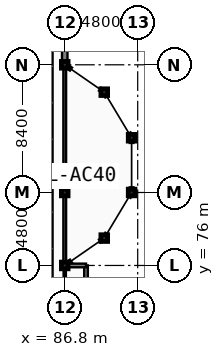
"""IFC4 building model, lengths in metres.
Left out: names, types, materials, properties, quantities, classifications, styles, units other than length and angle.
Written with IfcOpenShell. Run it as: python <this file> out.ifc"""

import sys

from ifc_helpers import new_model, si_unit, direction, frame, frame_2d, origin, origin_2d, place, context, subcontext, project, spatial, rectangle, extrude, element, fill, save


model = new_model("IFC4")
c1 = context("Model", 3, precision=1e-05, world=origin(), true_north=direction((0.0, 1.0)))
c2 = subcontext(c1, "Body", "Model", "MODEL_VIEW")
j1 = project(units=[si_unit("LENGTHUNIT", "METRE"), si_unit("PLANEANGLEUNIT", "RADIAN")], contexts=[c1])
p1 = place(None, origin())
s1 = spatial("IfcSite", under=j1, at=p1, CompositionType="ELEMENT")
p2 = place(p1, origin())
s2 = spatial("IfcBuilding", under=s1, at=p2, CompositionType="ELEMENT")
p3 = place(p2, frame((0.0, 0.0, 9.6)))
s3 = spatial("IfcBuildingStorey", under=s2, at=p3, CompositionType="ELEMENT", Elevation=9.6)
for number, where, z_axis, x_axis in (
    (1, (86.8, 76.0, 0.0), (0.0, 0.0, 1.0), (1.0, 0.0, 0.0)),
    (2, (86.8, 80.8, 0.0), (0.0, 0.0, 1.0), (1.0, 0.0, 0.0)),
    (3, (86.8, 89.2, 0.0), (0.0, 0.0, 1.0), (1.0, 0.0, 0.0)),
    (4, (89.4, 77.8, 0.0), (0.0, 0.0, 1.0), (1.0, 0.0, 0.0)),
    (5, (89.4, 87.4, 0.0), (0.0, 0.0, 1.0), (1.0, 0.0, 0.0)),
    (6, (91.2, 80.8, 0.0), (0.0, 0.0, 1.0), (1.0, 0.0, 0.0)),
    (7, (91.2, 84.4, 0.0), (0.0, 0.0, 1.0), (1.0, 0.0, 0.0)),
):
    element("IfcColumn", number, at=place(p3, frame(where, z_axis=z_axis, x_axis=x_axis)), inside=s3, PredefinedType="COLUMN", context=c2, shape_type="SweptSolid", body=[
        extrude(rectangle(XDim=0.44, YDim=0.44, at=origin_2d()), origin(), (0.0, 0.0, 1.0), 4.2),
    ])
p4 = place(p3, frame((86.8, 67.6, 0.0), z_axis=(0.0, 0.0, 1.0), x_axis=(0.0, 1.0, 0.0)))
e8 = element("IfcWall", 8, at=p4, inside=s3, PredefinedType="PARTITIONING", context=c2, shape_type="SweptSolid", body=[
    extrude(rectangle(XDim=8.4, YDim=0.15, at=frame_2d((4.2, 0.0))), origin(), (0.0, 0.0, 1.0), 3.27),
])
p5 = place(p4, frame((3.7, 0.0, -0.01)))
e9 = element("IfcOpeningElement", 9, at=p5, cuts=e8, PredefinedType="OPENING", context=c2, shape_type="SweptSolid", body=[
    extrude(rectangle(XDim=1.0, YDim=2.16, at=frame_2d((0.5, 1.08))), frame((0.0, 0.085, 0.0), z_axis=(0.0, -1.0, 0.0), x_axis=(1.0, 0.0, 0.0)), (0.0, 0.0, 1.0), 0.17),
])
p6 = place(p3, frame((86.8, 76.0, 0.0), z_axis=(0.0, 0.0, 1.0), x_axis=(0.0, 1.0, 0.0)))
e10 = element("IfcWall", 10, at=p6, inside=s3, PredefinedType="PARTITIONING", context=c2, shape_type="SweptSolid", body=[
    extrude(rectangle(XDim=13.2, YDim=0.18, at=frame_2d((6.6, 0.0))), origin(), (0.0, 0.0, 1.0), 3.27),
])
p7 = place(p6, frame((5.8, 0.0, -0.01)))
e11 = element("IfcOpeningElement", 11, at=p7, cuts=e10, PredefinedType="OPENING", context=c2, shape_type="SweptSolid", body=[
    extrude(rectangle(XDim=1.6, YDim=2.21, at=frame_2d((0.8, 1.105))), frame((0.0, 0.1, 0.0), z_axis=(0.0, -1.0, 0.0), x_axis=(1.0, 0.0, 0.0)), (0.0, 0.0, 1.0), 0.2),
])
p8 = place(p3, frame((86.8, 89.2, 0.0), z_axis=(0.0, 0.0, 1.0), x_axis=(0.0, 1.0, 0.0)))
e12 = element("IfcWall", 12, at=p8, inside=s3, PredefinedType="SOLIDWALL", context=c2, shape_type="SweptSolid", body=[
    extrude(rectangle(XDim=8.4, YDim=0.36, at=frame_2d((4.2, 0.0))), origin(), (0.0, 0.0, 1.0), 3.27),
])
p9 = place(p8, frame((0.46, 0.0, 0.75)))
e13 = element("IfcOpeningElement", 13, at=p9, cuts=e12, PredefinedType="OPENING", context=c2, shape_type="SweptSolid", body=[
    extrude(rectangle(XDim=1.55, YDim=2.38, at=frame_2d((0.775, 1.19))), frame((0.0, 0.19, 0.0), z_axis=(0.0, -1.0, 0.0), x_axis=(1.0, 0.0, 0.0)), (0.0, 0.0, 1.0), 0.38),
])
p10 = place(p8, frame((6.26, 0.0, 0.75)))
e14 = element("IfcOpeningElement", 14, at=p10, cuts=e12, PredefinedType="OPENING", context=c2, shape_type="SweptSolid", body=[
    extrude(rectangle(XDim=1.55, YDim=2.38, at=frame_2d((0.775, 1.19))), frame((0.0, 0.19, 0.0), z_axis=(0.0, -1.0, 0.0), x_axis=(1.0, 0.0, 0.0)), (0.0, 0.0, 1.0), 0.38),
])
p11 = place(p3, frame((87.03, 76.159, 0.0), z_axis=(0.0, 0.0, 1.0), x_axis=(0.822192191644, 0.56920997883, 0.0)))
e15 = element("IfcWall", 15, at=p11, inside=s3, PredefinedType="SOLIDWALL", context=c2, shape_type="SweptSolid", body=[
    extrude(rectangle(XDim=0.22, YDim=0.24, at=frame_2d((0.11, 0.0))), origin(), (0.0, 0.0, 1.0), 3.27),
])
p12 = place(p3, frame((89.121, 77.606, 0.0), z_axis=(0.0, 0.0, 1.0), x_axis=(0.821855834467, 0.569695521619, 0.0)))
e16 = element("IfcWall", 16, at=p12, inside=s3, PredefinedType="SOLIDWALL", context=c2, shape_type="SweptSolid", body=[
    extrude(rectangle(XDim=0.34, YDim=0.24, at=frame_2d((0.17, 0.0))), origin(), (0.0, 0.0, 1.0), 3.27),
])
p13 = place(p3, frame((89.4, 77.8, 0.0), z_axis=(0.0, 0.0, 1.0), x_axis=(0.514812489021, 0.857302805984, 0.0)))
e17 = element("IfcWall", 17, at=p13, inside=s3, PredefinedType="SOLIDWALL", context=c2, shape_type="SweptSolid", body=[
    extrude(rectangle(XDim=0.34, YDim=0.24, at=frame_2d((0.17, 0.0))), origin(), (0.0, 0.0, 1.0), 3.27),
])
for number, where, z_axis, x_axis in (
    (18, (91.025, 80.509, 0.0), (0.0, 0.0, 1.0), (0.514, 0.858, 0.0)),
    (19, (91.2, 80.8, 0.0), (0.0, 0.0, 1.0), (0.0, 1.0, 0.0)),
    (20, (91.2, 84.06, 0.0), (0.0, 0.0, 1.0), (0.0, 1.0, 0.0)),
    (21, (91.2, 84.4, 0.0), (0.0, 0.0, 1.0), (-0.514, 0.858, 0.0)),
):
    element("IfcWall", number, at=place(p3, frame(where, z_axis=z_axis, x_axis=x_axis)), inside=s3, PredefinedType="SOLIDWALL", context=c2, shape_type="SweptSolid", body=[
        extrude(rectangle(XDim=0.34, YDim=0.24, at=frame_2d((0.17, 0.0))), origin(), (0.0, 0.0, 1.0), 3.27),
    ])
p14 = place(p3, frame((89.575, 87.108, 0.0), z_axis=(0.0, 0.0, 1.0), x_axis=(-0.514812489021, 0.857302805984, 0.0)))
e22 = element("IfcWall", 22, at=p14, inside=s3, PredefinedType="SOLIDWALL", context=c2, shape_type="SweptSolid", body=[
    extrude(rectangle(XDim=0.34, YDim=0.24, at=frame_2d((0.17, 0.0))), origin(), (0.0, 0.0, 1.0), 3.27),
])
p15 = place(p3, frame((89.4, 87.4, 0.0), z_axis=(0.0, 0.0, 1.0), x_axis=(-0.821855834467, 0.569695521619, 0.0)))
e23 = element("IfcWall", 23, at=p15, inside=s3, PredefinedType="SOLIDWALL", context=c2, shape_type="SweptSolid", body=[
    extrude(rectangle(XDim=0.34, YDim=0.24, at=frame_2d((0.17, 0.0))), origin(), (0.0, 0.0, 1.0), 3.27),
])
p16 = place(p3, frame((87.211, 88.915, 0.0), z_axis=(0.0, 0.0, 1.0), x_axis=(-0.822192191644, 0.56920997883, 0.0)))
e24 = element("IfcWall", 24, at=p16, inside=s3, PredefinedType="SOLIDWALL", context=c2, shape_type="SweptSolid", body=[
    extrude(rectangle(XDim=0.22, YDim=0.24, at=frame_2d((0.11, 0.0))), origin(), (0.0, 0.0, 1.0), 3.27),
])
p17 = place(p3, frame((88.2, 67.6, 0.0), z_axis=(0.0, 0.0, 1.0), x_axis=(0.0, 1.0, 0.0)))
e25 = element("IfcWall", 25, at=p17, inside=s3, PredefinedType="SOLIDWALL", context=c2, shape_type="SweptSolid", body=[
    extrude(rectangle(XDim=8.4, YDim=0.24, at=frame_2d((4.2, 0.0))), origin(), (0.0, 0.0, 1.0), 3.27),
])
p18 = place(p17, frame((0.46, 0.0, 0.65)))
e26 = element("IfcOpeningElement", 26, at=p18, cuts=e25, PredefinedType="OPENING", context=c2, shape_type="SweptSolid", body=[
    extrude(rectangle(XDim=2.4, YDim=2.2, at=frame_2d((1.2, 1.1))), frame((0.0, 0.13, 0.0), z_axis=(0.0, -1.0, 0.0), x_axis=(1.0, 0.0, 0.0)), (0.0, 0.0, 1.0), 0.26),
])
p19 = place(p17, frame((5.46, 0.0, 0.65)))
e27 = element("IfcOpeningElement", 27, at=p19, cuts=e25, PredefinedType="OPENING", context=c2, shape_type="SweptSolid", body=[
    extrude(rectangle(XDim=2.4, YDim=2.2, at=frame_2d((1.2, 1.1))), frame((0.0, 0.13, 0.0), z_axis=(0.0, -1.0, 0.0), x_axis=(1.0, 0.0, 0.0)), (0.0, 0.0, 1.0), 0.26),
])
p20 = place(p3, frame((88.2, 76.0, 0.0), z_axis=(0.0, 0.0, 1.0), x_axis=(-1.0, 0.0, 0.0)))
e28 = element("IfcWall", 28, at=p20, inside=s3, PredefinedType="SOLIDWALL", context=c2, shape_type="SweptSolid", body=[
    extrude(rectangle(XDim=1.4, YDim=0.24, at=frame_2d((0.7, 0.0))), origin(), (0.0, 0.0, 1.0), 3.27),
])
p21 = place(p7, frame((1.6, 0.0, 0.01), z_axis=(0.0, 0.0, 1.0), x_axis=(-1.0, 0.0, 0.0)))
e29 = element("IfcDoor", 29, at=p21, inside=s3, OperationType="DOUBLE_SWING_LEFT", PredefinedType="DOOR", context=c2, shape_type="SweptSolid", body=[
    extrude(rectangle(XDim=1.6, YDim=2.2, at=frame_2d((0.8, 1.1))), frame((0.0, 0.025, 0.0), z_axis=(0.0, -1.0, 0.0), x_axis=(1.0, 0.0, 0.0)), (0.0, 0.0, 1.0), 0.05),
])
fill(e11, e29)
p22 = place(p9, origin())
e30 = element("IfcWindow", 30, at=p22, inside=s3, PartitioningType="DOUBLE_PANEL_HORIZONTAL", PredefinedType="WINDOW", context=c2, shape_type="SweptSolid", body=[
    extrude(rectangle(XDim=1.55, YDim=2.38, at=frame_2d((0.775, 1.19))), frame((0.0, 0.03, 0.0), z_axis=(0.0, -1.0, 0.0), x_axis=(1.0, 0.0, 0.0)), (0.0, 0.0, 1.0), 0.06),
])
fill(e13, e30)
p23 = place(p19, origin())
e31 = element("IfcWindow", 31, at=p23, inside=s3, PartitioningType="TRIPLE_PANEL_VERTICAL", PredefinedType="WINDOW", context=c2, shape_type="SweptSolid", body=[
    extrude(rectangle(XDim=2.4, YDim=2.2, at=frame_2d((1.2, 1.1))), frame((0.0, 0.03, 0.0), z_axis=(0.0, -1.0, 0.0), x_axis=(1.0, 0.0, 0.0)), (0.0, 0.0, 1.0), 0.06),
])
fill(e27, e31)
save(model, sys.argv[1])
